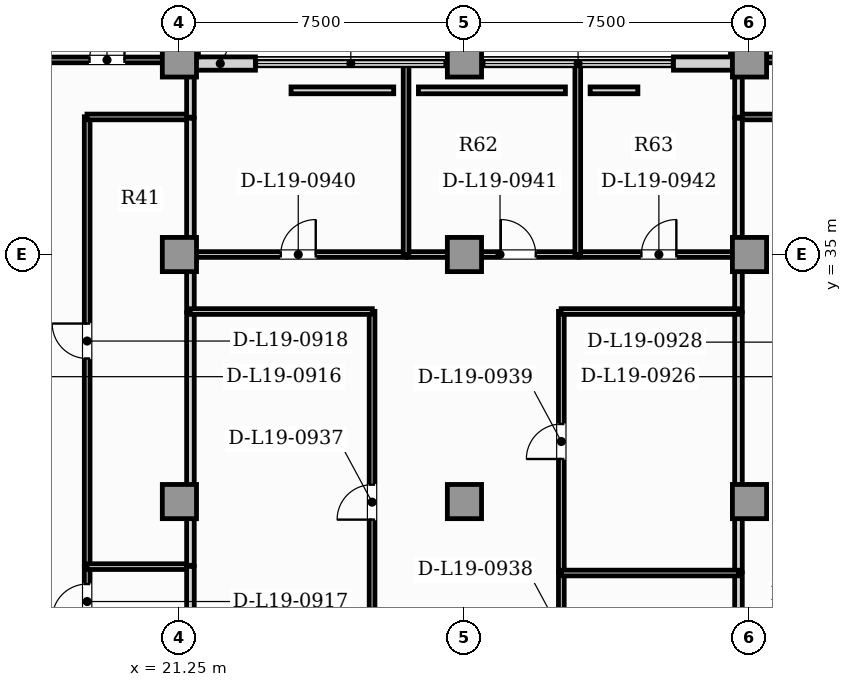
"""IFC4 building model, lengths in metres.
Left out: names, types, materials, properties, quantities, classifications, styles, units other than length and angle.
Written with IfcOpenShell. Run it as: python <this file> out.ifc"""

import sys

from ifc_helpers import new_model, si_unit, direction, frame, frame_2d, origin, origin_2d, place, context, subcontext, project, spatial, rectangle, extrude, element, fill, save


model = new_model("IFC4")
c1 = context("Model", 3, precision=1e-05, world=origin(), true_north=direction((0.0, 1.0)))
c2 = subcontext(c1, "Body", "Model", "MODEL_VIEW")
j1 = project(units=[si_unit("LENGTHUNIT", "METRE"), si_unit("PLANEANGLEUNIT", "RADIAN")], contexts=[c1])
p1 = place(None, origin())
s1 = spatial("IfcSite", under=j1, at=p1, CompositionType="ELEMENT")
p2 = place(p1, origin())
s2 = spatial("IfcBuilding", under=s1, at=p2, CompositionType="ELEMENT")
p3 = place(p2, frame((0.0, 0.0, 81.05)))
s3 = spatial("IfcBuildingStorey", under=s2, at=p3, CompositionType="ELEMENT", Elevation=81.05)
for number, where, z_axis, x_axis in (
    (1, (21.25, 28.5, 0.0), (0.0, 0.0, 1.0), (1.0, 0.0, 0.0)),
    (2, (28.75, 28.5, 0.0), (0.0, 0.0, 1.0), (1.0, 0.0, 0.0)),
    (3, (36.25, 28.5, 0.0), (0.0, 0.0, 1.0), (1.0, 0.0, 0.0)),
    (4, (21.25, 40.12, 0.0), (0.0, 0.0, 1.0), (1.0, 0.0, 0.0)),
    (5, (28.75, 40.12, 0.0), (0.0, 0.0, 1.0), (1.0, 0.0, 0.0)),
    (6, (36.25, 40.12, 0.0), (0.0, 0.0, 1.0), (1.0, 0.0, 0.0)),
    (7, (21.25, 35.0, 0.0), (0.0, 0.0, 1.0), (1.0, 0.0, 0.0)),
    (8, (28.75, 35.0, 0.0), (0.0, 0.0, 1.0), (1.0, 0.0, 0.0)),
    (9, (36.25, 35.0, 0.0), (0.0, 0.0, 1.0), (1.0, 0.0, 0.0)),
):
    element("IfcColumn", number, at=place(p3, frame(where, z_axis=z_axis, x_axis=x_axis)), inside=s3, PredefinedType="COLUMN", context=c2, shape_type="SweptSolid", body=[
        extrude(rectangle(XDim=0.9, YDim=0.9, at=origin_2d()), origin(), (0.0, 0.0, 1.0), 3.85),
    ])
p4 = place(p3, frame((35.925, 46.36, 0.0), z_axis=(0.0, 0.0, 1.0), x_axis=(0.0, -1.0, 0.0)))
e10 = element("IfcWall", 10, at=p4, inside=s3, PredefinedType="SOLIDWALL", context=c2, shape_type="SweptSolid", body=[
    extrude(rectangle(XDim=6.16, YDim=0.35, at=frame_2d((3.08, 0.0))), origin(), (0.0, 0.0, 1.0), 3.6),
])
for number, where, z_axis, x_axis in (
    (11, (21.4, 40.025, 0.0), (0.0, 0.0, 1.0), (1.0, 0.0, 0.0)),
    (12, (34.25, 40.025, 0.0), (0.0, 0.0, 1.0), (1.0, 0.0, 0.0)),
):
    element("IfcWall", number, at=place(p3, frame(where, z_axis=z_axis, x_axis=x_axis)), inside=s3, PredefinedType="SOLIDWALL", context=c2, shape_type="SweptSolid", body=[
        extrude(rectangle(XDim=1.85, YDim=0.35, at=frame_2d((0.925, 0.0))), origin(), (0.0, 0.0, 1.0), 3.6),
    ])
p5 = place(p3, frame((21.575, 40.2, 0.0), z_axis=(0.0, 0.0, 1.0), x_axis=(0.0, 1.0, 0.0)))
e13 = element("IfcWall", 13, at=p5, inside=s3, PredefinedType="SOLIDWALL", context=c2, shape_type="SweptSolid", body=[
    extrude(rectangle(XDim=6.16, YDim=0.35, at=frame_2d((3.08, 0.0))), origin(), (0.0, 0.0, 1.0), 3.6),
])
p6 = place(p5, frame((0.77, 0.0, 0.9)))
e14 = element("IfcOpeningElement", 14, at=p6, cuts=e13, PredefinedType="OPENING", context=c2, shape_type="SweptSolid", body=[
    extrude(rectangle(XDim=1.5, YDim=1.95, at=frame_2d((0.75, 0.975))), frame((0.0, 0.185, 0.0), z_axis=(0.0, -1.0, 0.0), x_axis=(1.0, 0.0, 0.0)), (0.0, 0.0, 1.0), 0.37),
])
p7 = place(p3, frame((18.823, 24.947, 0.0), z_axis=(0.0, 0.0, 1.0), x_axis=(0.0, 1.0, 0.0)))
e15 = element("IfcWall", 15, at=p7, inside=s3, PredefinedType="PARTITIONING", context=c2, shape_type="SweptSolid", body=[
    extrude(rectangle(XDim=1.846, YDim=0.15, at=frame_2d((0.923, 0.0))), origin(), (0.0, 0.0, 1.0), 3.6),
])
p8 = place(p7, frame((0.463, 0.0, 0.0)))
e16 = element("IfcOpeningElement", 16, at=p8, cuts=e15, PredefinedType="OPENING", context=c2, shape_type="SweptSolid", body=[
    extrude(rectangle(XDim=0.92, YDim=2.1, at=frame_2d((0.46, 1.05))), frame((0.0, 0.085, 0.0), z_axis=(0.0, -1.0, 0.0), x_axis=(1.0, 0.0, 0.0)), (0.0, 0.0, 1.0), 0.17),
])
p9 = place(p3, frame((18.823, 26.823, 0.0), z_axis=(0.0, 0.0, 1.0), x_axis=(0.0, 1.0, 0.0)))
e17 = element("IfcWall", 17, at=p9, inside=s3, PredefinedType="PARTITIONING", context=c2, shape_type="SweptSolid", body=[
    extrude(rectangle(XDim=11.802, YDim=0.15, at=frame_2d((5.901, 0.0))), origin(), (0.0, 0.0, 1.0), 3.6),
])
p10 = place(p9, frame((5.441, 0.0, 0.0)))
e18 = element("IfcOpeningElement", 18, at=p10, cuts=e17, PredefinedType="OPENING", context=c2, shape_type="SweptSolid", body=[
    extrude(rectangle(XDim=0.92, YDim=2.1, at=frame_2d((0.46, 1.05))), frame((0.0, 0.085, 0.0), z_axis=(0.0, -1.0, 0.0), x_axis=(1.0, 0.0, 0.0)), (0.0, 0.0, 1.0), 0.17),
])
p11 = place(p3, frame((18.818, 38.62, 0.0), z_axis=(0.0, 0.0, 1.0), x_axis=(1.0, 0.0, 0.0)))
e19 = element("IfcWall", 19, at=p11, inside=s3, PredefinedType="PARTITIONING", context=c2, shape_type="SweptSolid", body=[
    extrude(rectangle(XDim=2.727, YDim=0.15, at=frame_2d((1.364, 0.0))), origin(), (0.0, 0.0, 1.0), 3.6),
])
p12 = place(p3, frame((17.296, 40.12, 0.0), z_axis=(0.0, 0.0, 1.0), x_axis=(1.0, 0.0, 0.0)))
e20 = element("IfcWall", 20, at=p12, inside=s3, PredefinedType="PARTITIONING", context=c2, shape_type="SweptSolid", body=[
    extrude(rectangle(XDim=4.097, YDim=0.15, at=frame_2d((2.048, 0.0))), origin(), (0.0, 0.0, 1.0), 3.6),
])
p13 = place(p12, frame((1.588, 0.0, 0.0)))
e21 = element("IfcOpeningElement", 21, at=p13, cuts=e20, PredefinedType="OPENING", context=c2, shape_type="SweptSolid", body=[
    extrude(rectangle(XDim=0.92, YDim=2.1, at=frame_2d((0.46, 1.05))), frame((0.0, 0.085, 0.0), z_axis=(0.0, -1.0, 0.0), x_axis=(1.0, 0.0, 0.0)), (0.0, 0.0, 1.0), 0.17),
])
p14 = place(p3, frame((21.54, 38.615, 0.0), z_axis=(0.0, 0.0, 1.0), x_axis=(0.0, 1.0, 0.0)))
e22 = element("IfcWall", 22, at=p14, inside=s3, PredefinedType="PARTITIONING", context=c2, shape_type="SweptSolid", body=[
    extrude(rectangle(XDim=1.375, YDim=0.2, at=frame_2d((0.688, 0.0))), origin(), (0.0, 0.0, 1.0), 3.6),
])
p15 = place(p3, frame((18.818, 26.788, 0.0), z_axis=(0.0, 0.0, 1.0), x_axis=(1.0, 0.0, 0.0)))
e23 = element("IfcWall", 23, at=p15, inside=s3, PredefinedType="PARTITIONING", context=c2, shape_type="SweptSolid", body=[
    extrude(rectangle(XDim=2.727, YDim=0.15, at=frame_2d((1.364, 0.0))), origin(), (0.0, 0.0, 1.0), 3.6),
])
p16 = place(p3, frame((21.54, 17.769, 0.0), z_axis=(0.0, 0.0, 1.0), x_axis=(0.0, 1.0, 0.0)))
e24 = element("IfcWall", 24, at=p16, inside=s3, PredefinedType="PARTITIONING", context=c2, shape_type="SweptSolid", body=[
    extrude(rectangle(XDim=9.024, YDim=0.2, at=frame_2d((4.512, 0.0))), origin(), (0.0, 0.0, 1.0), 3.6),
])
p17 = place(p3, frame((21.54, 33.495, 0.0), z_axis=(0.0, 0.0, 1.0), x_axis=(0.0, 1.0, 0.0)))
e25 = element("IfcWall", 25, at=p17, inside=s3, PredefinedType="PARTITIONING", context=c2, shape_type="SweptSolid", body=[
    extrude(rectangle(XDim=1.51, YDim=0.2, at=frame_2d((0.755, 0.0))), origin(), (0.0, 0.0, 1.0), 3.6),
])
p18 = place(p3, frame((21.54, 26.823, 0.0), z_axis=(0.0, 0.0, 1.0), x_axis=(0.0, 1.0, 0.0)))
e26 = element("IfcWall", 26, at=p18, inside=s3, PredefinedType="PARTITIONING", context=c2, shape_type="SweptSolid", body=[
    extrude(rectangle(XDim=6.642, YDim=0.2, at=frame_2d((3.321, 0.0))), origin(), (0.0, 0.0, 1.0), 3.6),
])
p19 = place(p3, frame((21.54, 35.035, 0.0), z_axis=(0.0, 0.0, 1.0), x_axis=(0.0, 1.0, 0.0)))
e27 = element("IfcWall", 27, at=p19, inside=s3, PredefinedType="PARTITIONING", context=c2, shape_type="SweptSolid", body=[
    extrude(rectangle(XDim=3.55, YDim=0.2, at=frame_2d((1.775, 0.0))), origin(), (0.0, 0.0, 1.0), 3.6),
])
p20 = place(p3, frame((35.955, 38.62, 0.0), z_axis=(0.0, 0.0, 1.0), x_axis=(1.0, 0.0, 0.0)))
e28 = element("IfcWall", 28, at=p20, inside=s3, PredefinedType="PARTITIONING", context=c2, shape_type="SweptSolid", body=[
    extrude(rectangle(XDim=2.727, YDim=0.15, at=frame_2d((1.364, 0.0))), origin(), (0.0, 0.0, 1.0), 3.6),
])
p21 = place(p3, frame((36.107, 40.12, 0.0), z_axis=(0.0, 0.0, 1.0), x_axis=(1.0, 0.0, 0.0)))
e29 = element("IfcWall", 29, at=p21, inside=s3, PredefinedType="PARTITIONING", context=c2, shape_type="SweptSolid", body=[
    extrude(rectangle(XDim=5.23, YDim=0.15, at=frame_2d((2.615, 0.0))), origin(), (0.0, 0.0, 1.0), 3.6),
])
p22 = place(p21, frame((2.155, 0.0, 0.0)))
e30 = element("IfcOpeningElement", 30, at=p22, cuts=e29, PredefinedType="OPENING", context=c2, shape_type="SweptSolid", body=[
    extrude(rectangle(XDim=0.92, YDim=2.1, at=frame_2d((0.46, 1.05))), frame((0.0, 0.085, 0.0), z_axis=(0.0, -1.0, 0.0), x_axis=(1.0, 0.0, 0.0)), (0.0, 0.0, 1.0), 0.17),
])
p23 = place(p3, frame((35.96, 38.615, 0.0), z_axis=(0.0, 0.0, 1.0), x_axis=(0.0, 1.0, 0.0)))
e31 = element("IfcWall", 31, at=p23, inside=s3, PredefinedType="PARTITIONING", context=c2, shape_type="SweptSolid", body=[
    extrude(rectangle(XDim=1.375, YDim=0.2, at=frame_2d((0.688, 0.0))), origin(), (0.0, 0.0, 1.0), 3.6),
])
p24 = place(p3, frame((35.96, 33.495, 0.0), z_axis=(0.0, 0.0, 1.0), x_axis=(0.0, 1.0, 0.0)))
e32 = element("IfcWall", 32, at=p24, inside=s3, PredefinedType="PARTITIONING", context=c2, shape_type="SweptSolid", body=[
    extrude(rectangle(XDim=1.51, YDim=0.2, at=frame_2d((0.755, 0.0))), origin(), (0.0, 0.0, 1.0), 3.6),
])
p25 = place(p3, frame((35.96, 21.391, 0.0), z_axis=(0.0, 0.0, 1.0), x_axis=(0.0, 1.0, 0.0)))
e33 = element("IfcWall", 33, at=p25, inside=s3, PredefinedType="PARTITIONING", context=c2, shape_type="SweptSolid", body=[
    extrude(rectangle(XDim=5.234, YDim=0.2, at=frame_2d((2.617, 0.0))), origin(), (0.0, 0.0, 1.0), 3.6),
])
p26 = place(p3, frame((35.96, 26.655, 0.0), z_axis=(0.0, 0.0, 1.0), x_axis=(0.0, 1.0, 0.0)))
e34 = element("IfcWall", 34, at=p26, inside=s3, PredefinedType="PARTITIONING", context=c2, shape_type="SweptSolid", body=[
    extrude(rectangle(XDim=6.81, YDim=0.2, at=frame_2d((3.405, 0.0))), origin(), (0.0, 0.0, 1.0), 3.6),
])
p27 = place(p3, frame((35.96, 35.035, 0.0), z_axis=(0.0, 0.0, 1.0), x_axis=(0.0, 1.0, 0.0)))
e35 = element("IfcWall", 35, at=p27, inside=s3, PredefinedType="PARTITIONING", context=c2, shape_type="SweptSolid", body=[
    extrude(rectangle(XDim=3.55, YDim=0.2, at=frame_2d((1.775, 0.0))), origin(), (0.0, 0.0, 1.0), 3.6),
])
p28 = place(p3, frame((26.319, 23.464, 0.0), z_axis=(0.0, 0.0, 1.0), x_axis=(0.0, 1.0, 0.0)))
e36 = element("IfcWall", 36, at=p28, inside=s3, PredefinedType="PARTITIONING", context=c2, shape_type="SweptSolid", body=[
    extrude(rectangle(XDim=10.041, YDim=0.15, at=frame_2d((5.02, 0.0))), origin(), (0.0, 0.0, 1.0), 3.6),
])
p29 = place(p28, frame((4.56, 0.0, 0.0)))
e37 = element("IfcOpeningElement", 37, at=p29, cuts=e36, PredefinedType="OPENING", context=c2, shape_type="SweptSolid", body=[
    extrude(rectangle(XDim=0.92, YDim=2.1, at=frame_2d((0.46, 1.05))), frame((0.0, 0.085, 0.0), z_axis=(0.0, -1.0, 0.0), x_axis=(1.0, 0.0, 0.0)), (0.0, 0.0, 1.0), 0.17),
])
p30 = place(p3, frame((21.535, 33.5, 0.0), z_axis=(0.0, 0.0, 1.0), x_axis=(1.0, 0.0, 0.0)))
e38 = element("IfcWall", 38, at=p30, inside=s3, PredefinedType="PARTITIONING", context=c2, shape_type="SweptSolid", body=[
    extrude(rectangle(XDim=4.789, YDim=0.15, at=frame_2d((2.395, 0.0))), origin(), (0.0, 0.0, 1.0), 3.6),
])
p31 = place(p3, frame((31.299, 23.464, 0.0), z_axis=(0.0, 0.0, 1.0), x_axis=(0.0, 1.0, 0.0)))
e39 = element("IfcWall", 39, at=p31, inside=s3, PredefinedType="PARTITIONING", context=c2, shape_type="SweptSolid", body=[
    extrude(rectangle(XDim=3.161, YDim=0.15, at=frame_2d((1.58, 0.0))), origin(), (0.0, 0.0, 1.0), 3.6),
])
p32 = place(p31, frame((1.12, 0.0, 0.0)))
e40 = element("IfcOpeningElement", 40, at=p32, cuts=e39, PredefinedType="OPENING", context=c2, shape_type="SweptSolid", body=[
    extrude(rectangle(XDim=0.92, YDim=2.1, at=frame_2d((0.46, 1.05))), frame((0.0, 0.085, 0.0), z_axis=(0.0, -1.0, 0.0), x_axis=(1.0, 0.0, 0.0)), (0.0, 0.0, 1.0), 0.17),
])
p33 = place(p3, frame((31.299, 26.655, 0.0), z_axis=(0.0, 0.0, 1.0), x_axis=(0.0, 1.0, 0.0)))
e41 = element("IfcWall", 41, at=p33, inside=s3, PredefinedType="PARTITIONING", context=c2, shape_type="SweptSolid", body=[
    extrude(rectangle(XDim=6.85, YDim=0.15, at=frame_2d((3.425, 0.0))), origin(), (0.0, 0.0, 1.0), 3.6),
])
p34 = place(p33, frame((2.965, 0.0, 0.0)))
e42 = element("IfcOpeningElement", 42, at=p34, cuts=e41, PredefinedType="OPENING", context=c2, shape_type="SweptSolid", body=[
    extrude(rectangle(XDim=0.92, YDim=2.1, at=frame_2d((0.46, 1.05))), frame((0.0, 0.085, 0.0), z_axis=(0.0, -1.0, 0.0), x_axis=(1.0, 0.0, 0.0)), (0.0, 0.0, 1.0), 0.17),
])
p35 = place(p3, frame((31.294, 33.5, 0.0), z_axis=(0.0, 0.0, 1.0), x_axis=(1.0, 0.0, 0.0)))
e43 = element("IfcWall", 43, at=p35, inside=s3, PredefinedType="PARTITIONING", context=c2, shape_type="SweptSolid", body=[
    extrude(rectangle(XDim=4.671, YDim=0.15, at=frame_2d((2.335, 0.0))), origin(), (0.0, 0.0, 1.0), 3.6),
])
p36 = place(p3, frame((21.535, 35.0, 0.0), z_axis=(0.0, 0.0, 1.0), x_axis=(1.0, 0.0, 0.0)))
e44 = element("IfcWall", 44, at=p36, inside=s3, PredefinedType="PARTITIONING", context=c2, shape_type="SweptSolid", body=[
    extrude(rectangle(XDim=5.684, YDim=0.15, at=frame_2d((2.842, 0.0))), origin(), (0.0, 0.0, 1.0), 2.964),
])
p37 = place(p36, frame((2.382, 0.0, 0.0)))
e45 = element("IfcOpeningElement", 45, at=p37, cuts=e44, PredefinedType="OPENING", context=c2, shape_type="SweptSolid", body=[
    extrude(rectangle(XDim=0.92, YDim=2.1, at=frame_2d((0.46, 1.05))), frame((0.0, 0.085, 0.0), z_axis=(0.0, -1.0, 0.0), x_axis=(1.0, 0.0, 0.0)), (0.0, 0.0, 1.0), 0.17),
])
p38 = place(p3, frame((27.249, 35.0, 0.0), z_axis=(0.0, 0.0, 1.0), x_axis=(1.0, 0.0, 0.0)))
e46 = element("IfcWall", 46, at=p38, inside=s3, PredefinedType="PARTITIONING", context=c2, shape_type="SweptSolid", body=[
    extrude(rectangle(XDim=4.488, YDim=0.15, at=frame_2d((2.244, 0.0))), origin(), (0.0, 0.0, 1.0), 2.964),
])
p39 = place(p38, frame((2.457, 0.0, 0.0)))
e47 = element("IfcOpeningElement", 47, at=p39, cuts=e46, PredefinedType="OPENING", context=c2, shape_type="SweptSolid", body=[
    extrude(rectangle(XDim=0.92, YDim=2.1, at=frame_2d((0.46, 1.05))), frame((0.0, 0.085, 0.0), z_axis=(0.0, -1.0, 0.0), x_axis=(1.0, 0.0, 0.0)), (0.0, 0.0, 1.0), 0.17),
])
p40 = place(p3, frame((31.767, 35.0, 0.0), z_axis=(0.0, 0.0, 1.0), x_axis=(1.0, 0.0, 0.0)))
e48 = element("IfcWall", 48, at=p40, inside=s3, PredefinedType="PARTITIONING", context=c2, shape_type="SweptSolid", body=[
    extrude(rectangle(XDim=4.198, YDim=0.15, at=frame_2d((2.099, 0.0))), origin(), (0.0, 0.0, 1.0), 2.964),
])
p41 = place(p40, frame((1.639, 0.0, 0.0)))
e49 = element("IfcOpeningElement", 49, at=p41, cuts=e48, PredefinedType="OPENING", context=c2, shape_type="SweptSolid", body=[
    extrude(rectangle(XDim=0.92, YDim=2.1, at=frame_2d((0.46, 1.05))), frame((0.0, 0.085, 0.0), z_axis=(0.0, -1.0, 0.0), x_axis=(1.0, 0.0, 0.0)), (0.0, 0.0, 1.0), 0.17),
])
p42 = place(p3, frame((31.294, 26.62, 0.0), z_axis=(0.0, 0.0, 1.0), x_axis=(1.0, 0.0, 0.0)))
e50 = element("IfcWall", 50, at=p42, inside=s3, PredefinedType="PARTITIONING", context=c2, shape_type="SweptSolid", body=[
    extrude(rectangle(XDim=4.671, YDim=0.15, at=frame_2d((2.335, 0.0))), origin(), (0.0, 0.0, 1.0), 3.6),
])
p43 = place(p3, frame((27.214, 34.995, 0.0), z_axis=(0.0, 0.0, 1.0), x_axis=(0.0, 1.0, 0.0)))
e51 = element("IfcWall", 51, at=p43, inside=s3, PredefinedType="PARTITIONING", context=c2, shape_type="SweptSolid", body=[
    extrude(rectangle(XDim=5.012, YDim=0.15, at=frame_2d((2.506, 0.0))), origin(), (0.0, 0.0, 1.0), 3.6),
])
p44 = place(p3, frame((31.732, 34.995, 0.0), z_axis=(0.0, 0.0, 1.0), x_axis=(0.0, 1.0, 0.0)))
e52 = element("IfcWall", 52, at=p44, inside=s3, PredefinedType="PARTITIONING", context=c2, shape_type="SweptSolid", body=[
    extrude(rectangle(XDim=5.006, YDim=0.15, at=frame_2d((2.503, 0.0))), origin(), (0.0, 0.0, 1.0), 3.6),
])
p45 = place(p3, frame((24.187, 39.32, 0.0), z_axis=(0.0, 0.0, 1.0), x_axis=(1.0, 0.0, 0.0)))
e53 = element("IfcWall", 53, at=p45, inside=s3, PredefinedType="PARTITIONING", context=c2, shape_type="SweptSolid", body=[
    extrude(rectangle(XDim=2.703, YDim=0.18, at=frame_2d((1.351, 0.0))), origin(), (0.0, 0.0, 1.0), 3.6),
])
p46 = place(p3, frame((27.539, 39.32, 0.0), z_axis=(0.0, 0.0, 1.0), x_axis=(1.0, 0.0, 0.0)))
e54 = element("IfcWall", 54, at=p46, inside=s3, PredefinedType="PARTITIONING", context=c2, shape_type="SweptSolid", body=[
    extrude(rectangle(XDim=3.867, YDim=0.18, at=frame_2d((1.934, 0.0))), origin(), (0.0, 0.0, 1.0), 3.6),
])
p47 = place(p3, frame((32.057, 39.32, 0.0), z_axis=(0.0, 0.0, 1.0), x_axis=(1.0, 0.0, 0.0)))
e55 = element("IfcWall", 55, at=p47, inside=s3, PredefinedType="PARTITIONING", context=c2, shape_type="SweptSolid", body=[
    extrude(rectangle(XDim=1.257, YDim=0.18, at=frame_2d((0.628, 0.0))), origin(), (0.0, 0.0, 1.0), 3.6),
])
p48 = place(p8, origin())
e56 = element("IfcDoor", 56, at=p48, inside=s3, OperationType="SINGLE_SWING_LEFT", PredefinedType="DOOR", context=c2, shape_type="SweptSolid", body=[
    extrude(rectangle(XDim=0.92, YDim=2.1, at=frame_2d((0.46, 1.05))), frame((0.0, 0.025, 0.0), z_axis=(0.0, -1.0, 0.0), x_axis=(1.0, 0.0, 0.0)), (0.0, 0.0, 1.0), 0.05),
])
fill(e16, e56)
p49 = place(p10, origin())
e57 = element("IfcDoor", 57, at=p49, inside=s3, OperationType="SINGLE_SWING_RIGHT", PredefinedType="DOOR", context=c2, shape_type="SweptSolid", body=[
    extrude(rectangle(XDim=0.92, YDim=2.1, at=frame_2d((0.46, 1.05))), frame((0.0, 0.025, 0.0), z_axis=(0.0, -1.0, 0.0), x_axis=(1.0, 0.0, 0.0)), (0.0, 0.0, 1.0), 0.05),
])
fill(e18, e57)
p50 = place(p13, origin())
e58 = element("IfcDoor", 58, at=p50, inside=s3, OperationType="SINGLE_SWING_RIGHT", PredefinedType="DOOR", context=c2, shape_type="SweptSolid", body=[
    extrude(rectangle(XDim=0.92, YDim=2.1, at=frame_2d((0.46, 1.05))), frame((0.0, 0.025, 0.0), z_axis=(0.0, -1.0, 0.0), x_axis=(1.0, 0.0, 0.0)), (0.0, 0.0, 1.0), 0.05),
])
fill(e21, e58)
p51 = place(p29, origin())
e59 = element("IfcDoor", 59, at=p51, inside=s3, OperationType="SINGLE_SWING_LEFT", PredefinedType="DOOR", context=c2, shape_type="SweptSolid", body=[
    extrude(rectangle(XDim=0.92, YDim=2.1, at=frame_2d((0.46, 1.05))), frame((0.0, 0.025, 0.0), z_axis=(0.0, -1.0, 0.0), x_axis=(1.0, 0.0, 0.0)), (0.0, 0.0, 1.0), 0.05),
])
fill(e37, e59)
p52 = place(p34, origin())
e60 = element("IfcDoor", 60, at=p52, inside=s3, OperationType="SINGLE_SWING_LEFT", PredefinedType="DOOR", context=c2, shape_type="SweptSolid", body=[
    extrude(rectangle(XDim=0.92, YDim=2.1, at=frame_2d((0.46, 1.05))), frame((0.0, 0.025, 0.0), z_axis=(0.0, -1.0, 0.0), x_axis=(1.0, 0.0, 0.0)), (0.0, 0.0, 1.0), 0.05),
])
fill(e42, e60)
p53 = place(p37, origin())
e61 = element("IfcDoor", 61, at=p53, inside=s3, OperationType="SINGLE_SWING_RIGHT", PredefinedType="DOOR", context=c2, shape_type="SweptSolid", body=[
    extrude(rectangle(XDim=0.92, YDim=2.1, at=frame_2d((0.46, 1.05))), frame((0.0, 0.025, 0.0), z_axis=(0.0, -1.0, 0.0), x_axis=(1.0, 0.0, 0.0)), (0.0, 0.0, 1.0), 0.05),
])
fill(e45, e61)
p54 = place(p39, origin())
e62 = element("IfcDoor", 62, at=p54, inside=s3, OperationType="SINGLE_SWING_LEFT", PredefinedType="DOOR", context=c2, shape_type="SweptSolid", body=[
    extrude(rectangle(XDim=0.92, YDim=2.1, at=frame_2d((0.46, 1.05))), frame((0.0, 0.025, 0.0), z_axis=(0.0, -1.0, 0.0), x_axis=(1.0, 0.0, 0.0)), (0.0, 0.0, 1.0), 0.05),
])
fill(e47, e62)
p55 = place(p41, origin())
e63 = element("IfcDoor", 63, at=p55, inside=s3, OperationType="SINGLE_SWING_RIGHT", PredefinedType="DOOR", context=c2, shape_type="SweptSolid", body=[
    extrude(rectangle(XDim=0.92, YDim=2.1, at=frame_2d((0.46, 1.05))), frame((0.0, 0.025, 0.0), z_axis=(0.0, -1.0, 0.0), x_axis=(1.0, 0.0, 0.0)), (0.0, 0.0, 1.0), 0.05),
])
fill(e49, e63)
save(model, sys.argv[1])
